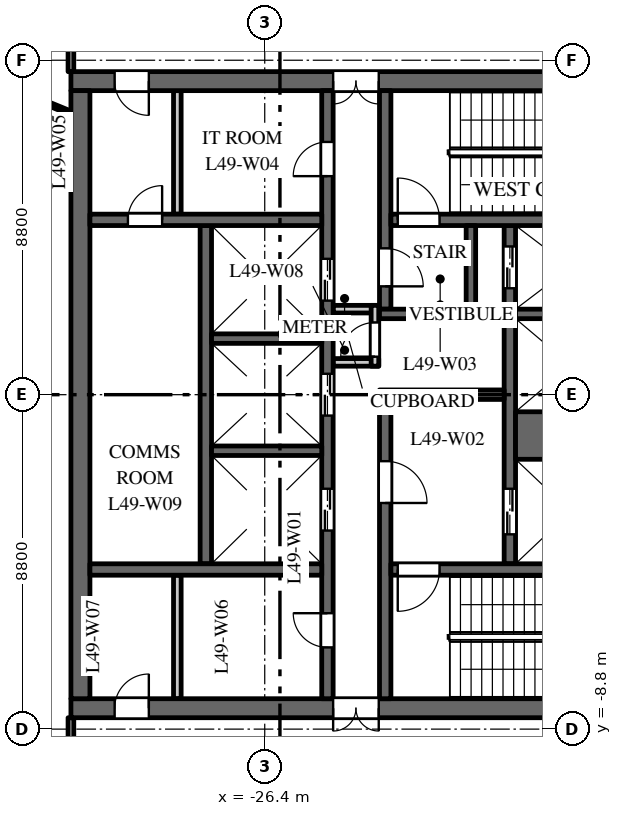
"""IFC4 building model, lengths in metres.
Left out: names, types, materials, properties, quantities, classifications, styles, units other than length and angle.
Written with IfcOpenShell. Run it as: python <this file> out.ifc"""

import sys

from ifc_helpers import new_model, si_unit, direction, frame, frame_2d, origin, place, context, subcontext, project, spatial, rectangle, extrude, element, fill, save


model = new_model("IFC4")
c1 = context("Model", 3, precision=1e-05, world=origin(), true_north=direction((0.0, 1.0)))
c2 = subcontext(c1, "Body", "Model", "MODEL_VIEW")
j1 = project(units=[si_unit("LENGTHUNIT", "METRE"), si_unit("PLANEANGLEUNIT", "RADIAN")], contexts=[c1])
p1 = place(None, origin())
s1 = spatial("IfcSite", under=j1, at=p1, CompositionType="ELEMENT")
p2 = place(p1, origin())
s2 = spatial("IfcBuilding", under=s1, at=p2, CompositionType="ELEMENT")
p3 = place(p2, frame((0.0, 0.0, 237.5)))
s3 = spatial("IfcBuildingStorey", under=s2, at=p3, CompositionType="ELEMENT", Elevation=237.5)
p4 = place(p3, frame((-16.5, 8.25, 0.0), z_axis=(0.0, 0.0, 1.0), x_axis=(-1.0, 0.0, 0.0)))
e1 = element("IfcWall", 1, at=p4, inside=s3, PredefinedType="SHEAR", context=c2, shape_type="SweptSolid", body=[
    extrude(rectangle(XDim=15.0, YDim=0.5, at=frame_2d((7.5, 0.0))), origin(), (0.0, 0.0, 1.0), 3.7),
])
p5 = place(p4, frame((6.9, 0.0, 0.0)))
e2 = element("IfcOpeningElement", 2, at=p5, cuts=e1, PredefinedType="OPENING", context=c2, shape_type="SweptSolid", body=[
    extrude(rectangle(XDim=1.2, YDim=2.1, at=frame_2d((0.6, 1.05))), frame((0.0, 0.26, 0.0), z_axis=(0.0, -1.0, 0.0), x_axis=(1.0, 0.0, 0.0)), (0.0, 0.0, 1.0), 0.52),
])
p6 = place(p4, frame((12.95, 0.0, 0.0)))
e3 = element("IfcOpeningElement", 3, at=p6, cuts=e1, PredefinedType="OPENING", context=c2, shape_type="SweptSolid", body=[
    extrude(rectangle(XDim=0.9, YDim=2.1, at=frame_2d((0.45, 1.05))), frame((0.0, 0.26, 0.0), z_axis=(0.0, -1.0, 0.0), x_axis=(1.0, 0.0, 0.0)), (0.0, 0.0, 1.0), 0.52),
])
p7 = place(p3, frame((-16.5, -8.25, 0.0), z_axis=(0.0, 0.0, 1.0), x_axis=(-1.0, 0.0, 0.0)))
e4 = element("IfcWall", 4, at=p7, inside=s3, PredefinedType="SHEAR", context=c2, shape_type="SweptSolid", body=[
    extrude(rectangle(XDim=15.0, YDim=0.5, at=frame_2d((7.5, 0.0))), origin(), (0.0, 0.0, 1.0), 3.7),
])
p8 = place(p7, frame((6.9, 0.0, 0.0)))
e5 = element("IfcOpeningElement", 5, at=p8, cuts=e4, PredefinedType="OPENING", context=c2, shape_type="SweptSolid", body=[
    extrude(rectangle(XDim=1.2, YDim=2.1, at=frame_2d((0.6, 1.05))), frame((0.0, 0.26, 0.0), z_axis=(0.0, -1.0, 0.0), x_axis=(1.0, 0.0, 0.0)), (0.0, 0.0, 1.0), 0.52),
])
p9 = place(p7, frame((12.95, 0.0, 0.0)))
e6 = element("IfcOpeningElement", 6, at=p9, cuts=e4, PredefinedType="OPENING", context=c2, shape_type="SweptSolid", body=[
    extrude(rectangle(XDim=0.9, YDim=2.1, at=frame_2d((0.45, 1.05))), frame((0.0, 0.26, 0.0), z_axis=(0.0, -1.0, 0.0), x_axis=(1.0, 0.0, 0.0)), (0.0, 0.0, 1.0), 0.52),
])
p10 = place(p3, frame((-27.95, -4.45, 0.0), z_axis=(0.0, 0.0, 1.0), x_axis=(0.0, 1.0, 0.0)))
e7 = element("IfcWall", 7, at=p10, inside=s3, PredefinedType="SHEAR", context=c2, shape_type="SweptSolid", body=[
    extrude(rectangle(XDim=8.9, YDim=0.3, at=frame_2d((4.45, 0.0))), origin(), (0.0, 0.0, 1.0), 3.7),
])
p11 = place(p3, frame((-19.95, -4.45, 0.0), z_axis=(0.0, 0.0, 1.0), x_axis=(0.0, 1.0, 0.0)))
e8 = element("IfcWall", 8, at=p11, inside=s3, PredefinedType="SHEAR", context=c2, shape_type="SweptSolid", body=[
    extrude(rectangle(XDim=8.9, YDim=0.3, at=frame_2d((4.45, 0.0))), origin(), (0.0, 0.0, 1.0), 3.7),
])
p12 = place(p11, frame((0.775, 0.0, 0.0)))
e9 = element("IfcOpeningElement", 9, at=p12, cuts=e8, PredefinedType="OPENING", context=c2, shape_type="SweptSolid", body=[
    extrude(rectangle(XDim=1.2, YDim=2.1, at=frame_2d((0.6, 1.05))), frame((0.0, 0.16, 0.0), z_axis=(0.0, -1.0, 0.0), x_axis=(1.0, 0.0, 0.0)), (0.0, 0.0, 1.0), 0.32),
])
p13 = place(p11, frame((7.25, 0.0, 0.0)))
e10 = element("IfcOpeningElement", 10, at=p13, cuts=e8, PredefinedType="OPENING", context=c2, shape_type="SweptSolid", body=[
    extrude(rectangle(XDim=1.1, YDim=2.1, at=frame_2d((0.55, 1.05))), frame((0.0, 0.16, 0.0), z_axis=(0.0, -1.0, 0.0), x_axis=(1.0, 0.0, 0.0)), (0.0, 0.0, 1.0), 0.32),
])
p14 = place(p3, frame((-24.75, -8.0, 0.0), z_axis=(0.0, 0.0, 1.0), x_axis=(0.0, 1.0, 0.0)))
e11 = element("IfcWall", 11, at=p14, inside=s3, PredefinedType="SHEAR", context=c2, shape_type="SweptSolid", body=[
    extrude(rectangle(XDim=16.0, YDim=0.3, at=frame_2d((8.0, 0.0))), origin(), (0.0, 0.0, 1.0), 3.7),
])
p15 = place(p14, frame((4.425, 0.0, 0.0)))
e12 = element("IfcOpeningElement", 12, at=p15, cuts=e11, PredefinedType="OPENING", context=c2, shape_type="SweptSolid", body=[
    extrude(rectangle(XDim=1.1, YDim=2.1, at=frame_2d((0.55, 1.05))), frame((0.0, 0.16, 0.0), z_axis=(0.0, -1.0, 0.0), x_axis=(1.0, 0.0, 0.0)), (0.0, 0.0, 1.0), 0.32),
])
p16 = place(p14, frame((7.45, 0.0, 0.0)))
e13 = element("IfcOpeningElement", 13, at=p16, cuts=e11, PredefinedType="OPENING", context=c2, shape_type="SweptSolid", body=[
    extrude(rectangle(XDim=1.1, YDim=2.1, at=frame_2d((0.55, 1.05))), frame((0.0, 0.16, 0.0), z_axis=(0.0, -1.0, 0.0), x_axis=(1.0, 0.0, 0.0)), (0.0, 0.0, 1.0), 0.32),
])
p17 = place(p14, frame((10.475, 0.0, 0.0)))
e14 = element("IfcOpeningElement", 14, at=p17, cuts=e11, PredefinedType="OPENING", context=c2, shape_type="SweptSolid", body=[
    extrude(rectangle(XDim=1.1, YDim=2.1, at=frame_2d((0.55, 1.05))), frame((0.0, 0.16, 0.0), z_axis=(0.0, -1.0, 0.0), x_axis=(1.0, 0.0, 0.0)), (0.0, 0.0, 1.0), 0.32),
])
p18 = place(p14, frame((13.75, 0.0, 0.0)))
e15 = element("IfcOpeningElement", 15, at=p18, cuts=e11, PredefinedType="OPENING", context=c2, shape_type="SweptSolid", body=[
    extrude(rectangle(XDim=0.9, YDim=2.1, at=frame_2d((0.45, 1.05))), frame((0.0, 0.16, 0.0), z_axis=(0.0, -1.0, 0.0), x_axis=(1.0, 0.0, 0.0)), (0.0, 0.0, 1.0), 0.32),
])
p19 = place(p14, frame((1.35, 0.0, 0.0)))
e16 = element("IfcOpeningElement", 16, at=p19, cuts=e11, PredefinedType="OPENING", context=c2, shape_type="SweptSolid", body=[
    extrude(rectangle(XDim=0.9, YDim=2.1, at=frame_2d((0.45, 1.05))), frame((0.0, 0.16, 0.0), z_axis=(0.0, -1.0, 0.0), x_axis=(1.0, 0.0, 0.0)), (0.0, 0.0, 1.0), 0.32),
])
p20 = place(p3, frame((-20.1, 0.0, 0.0), z_axis=(0.0, 0.0, 1.0), x_axis=(-1.0, 0.0, 0.0)))
e17 = element("IfcWall", 17, at=p20, inside=s3, PredefinedType="SHEAR", context=c2, shape_type="SweptSolid", body=[
    extrude(rectangle(XDim=3.28, YDim=0.25, at=frame_2d((1.64, 0.0))), origin(), (0.0, 0.0, 1.0), 3.7),
])
for number, where, z_axis, x_axis in (
    (18, (-23.4, 0.85, 0.0), (0.0, 0.0, 1.0), (-1.0, 0.0, 0.0)),
    (19, (-23.4, 2.25, 0.0), (0.0, 0.0, 1.0), (-1.0, 0.0, 0.0)),
):
    element("IfcWall", number, at=place(p3, frame(where, z_axis=z_axis, x_axis=x_axis)), inside=s3, PredefinedType="PARTITIONING", context=c2, shape_type="SweptSolid", body=[
        extrude(rectangle(XDim=1.2, YDim=0.2, at=frame_2d((0.6, 0.0))), origin(), (0.0, 0.0, 1.0), 3.7),
    ])
p21 = place(p3, frame((-23.5, 0.75, 0.0), z_axis=(0.0, 0.0, 1.0), x_axis=(0.0, 1.0, 0.0)))
e20 = element("IfcWall", 20, at=p21, inside=s3, PredefinedType="PARTITIONING", context=c2, shape_type="SweptSolid", body=[
    extrude(rectangle(XDim=1.6, YDim=0.2, at=frame_2d((0.8, 0.0))), origin(), (0.0, 0.0, 1.0), 3.7),
])
p22 = place(p21, frame((0.25, 0.0, 0.0)))
e21 = element("IfcOpeningElement", 21, at=p22, cuts=e20, PredefinedType="OPENING", context=c2, shape_type="SweptSolid", body=[
    extrude(rectangle(XDim=0.9, YDim=2.1, at=frame_2d((0.45, 1.05))), frame((0.0, 0.11, 0.0), z_axis=(0.0, -1.0, 0.0), x_axis=(1.0, 0.0, 0.0)), (0.0, 0.0, 1.0), 0.22),
])
p23 = place(p3, frame((-31.25, -8.0, 0.0), z_axis=(0.0, 0.0, 1.0), x_axis=(0.0, 1.0, 0.0)))
e22 = element("IfcWall", 22, at=p23, inside=s3, PredefinedType="SHEAR", context=c2, shape_type="SweptSolid", body=[
    extrude(rectangle(XDim=16.0, YDim=0.5, at=frame_2d((8.0, 0.0))), origin(), (0.0, 0.0, 1.0), 3.7),
])
p24 = place(p3, frame((-24.9, 4.6, 0.0), z_axis=(0.0, 0.0, 1.0), x_axis=(-1.0, 0.0, 0.0)))
e23 = element("IfcWall", 23, at=p24, inside=s3, PredefinedType="SHEAR", context=c2, shape_type="SweptSolid", body=[
    extrude(rectangle(XDim=6.1, YDim=0.3, at=frame_2d((3.05, 0.0))), origin(), (0.0, 0.0, 1.0), 3.7),
])
p25 = place(p24, frame((4.2, 0.0, 0.0)))
e24 = element("IfcOpeningElement", 24, at=p25, cuts=e23, PredefinedType="OPENING", context=c2, shape_type="SweptSolid", body=[
    extrude(rectangle(XDim=0.9, YDim=2.1, at=frame_2d((0.45, 1.05))), frame((0.0, 0.16, 0.0), z_axis=(0.0, -1.0, 0.0), x_axis=(1.0, 0.0, 0.0)), (0.0, 0.0, 1.0), 0.32),
])
for number, where, z_axis, x_axis in (
    (25, (-28.7, 4.75, 0.0), (0.0, 0.0, 1.0), (0.0, 1.0, 0.0)),
    (26, (-28.7, -8.0, 0.0), (0.0, 0.0, 1.0), (0.0, 1.0, 0.0)),
):
    element("IfcWall", number, at=place(p3, frame(where, z_axis=z_axis, x_axis=x_axis)), inside=s3, PredefinedType="PARTITIONING", context=c2, shape_type="SweptSolid", body=[
        extrude(rectangle(XDim=3.25, YDim=0.2, at=frame_2d((1.625, 0.0))), origin(), (0.0, 0.0, 1.0), 3.7),
    ])
p26 = place(p3, frame((-24.9, -4.6, 0.0), z_axis=(0.0, 0.0, 1.0), x_axis=(-1.0, 0.0, 0.0)))
e27 = element("IfcWall", 27, at=p26, inside=s3, PredefinedType="SHEAR", context=c2, shape_type="SweptSolid", body=[
    extrude(rectangle(XDim=6.1, YDim=0.3, at=frame_2d((3.05, 0.0))), origin(), (0.0, 0.0, 1.0), 3.7),
])
p27 = place(p3, frame((-16.9, -1.075, 0.0), z_axis=(0.0, 0.0, 1.0), x_axis=(-1.0, 0.0, 0.0)))
e28 = element("IfcWall", 28, at=p27, inside=s3, PredefinedType="SHEAR", context=c2, shape_type="SweptSolid", body=[
    extrude(rectangle(XDim=2.9, YDim=1.25, at=frame_2d((1.45, 0.0))), origin(), (0.0, 0.0, 1.0), 3.7),
])
for number, where, z_axis, x_axis in (
    (29, (-16.9, 2.125, 0.0), (0.0, 0.0, 1.0), (-1.0, 0.0, 0.0)),
    (30, (-24.9, -1.475, 0.0), (0.0, 0.0, 1.0), (-1.0, 0.0, 0.0)),
    (31, (-24.9, 1.475, 0.0), (0.0, 0.0, 1.0), (-1.0, 0.0, 0.0)),
):
    element("IfcWall", number, at=place(p3, frame(where, z_axis=z_axis, x_axis=x_axis)), inside=s3, PredefinedType="SHEAR", context=c2, shape_type="SweptSolid", body=[
        extrude(rectangle(XDim=2.9, YDim=0.25, at=frame_2d((1.45, 0.0))), origin(), (0.0, 0.0, 1.0), 3.7),
    ])
p28 = place(p3, frame((-23.23, 2.25, 0.0), z_axis=(0.0, 0.0, 1.0), x_axis=(0.0, 1.0, 0.0)))
e32 = element("IfcWall", 32, at=p28, inside=s3, PredefinedType="SHEAR", context=c2, shape_type="SweptSolid", body=[
    extrude(rectangle(XDim=5.75, YDim=0.3, at=frame_2d((2.875, 0.0))), origin(), (0.0, 0.0, 1.0), 3.7),
])
p29 = place(p28, frame((0.6, 0.0, 0.0)))
e33 = element("IfcOpeningElement", 33, at=p29, cuts=e32, PredefinedType="OPENING", context=c2, shape_type="SweptSolid", body=[
    extrude(rectangle(XDim=1.0, YDim=2.1, at=frame_2d((0.5, 1.05))), frame((0.0, 0.16, 0.0), z_axis=(0.0, -1.0, 0.0), x_axis=(1.0, 0.0, 0.0)), (0.0, 0.0, 1.0), 0.32),
])
p30 = place(p3, frame((-23.23, -8.0, 0.0), z_axis=(0.0, 0.0, 1.0), x_axis=(0.0, 1.0, 0.0)))
e34 = element("IfcWall", 34, at=p30, inside=s3, PredefinedType="SHEAR", context=c2, shape_type="SweptSolid", body=[
    extrude(rectangle(XDim=7.875, YDim=0.3, at=frame_2d((3.938, 0.0))), origin(), (0.0, 0.0, 1.0), 3.7),
])
p31 = place(p30, frame((5.15, 0.0, 0.0)))
e35 = element("IfcOpeningElement", 35, at=p31, cuts=e34, PredefinedType="OPENING", context=c2, shape_type="SweptSolid", body=[
    extrude(rectangle(XDim=1.1, YDim=2.1, at=frame_2d((0.55, 1.05))), frame((0.0, 0.16, 0.0), z_axis=(0.0, -1.0, 0.0), x_axis=(1.0, 0.0, 0.0)), (0.0, 0.0, 1.0), 0.32),
])
p32 = place(p3, frame((-16.9, 4.6, 0.0), z_axis=(0.0, 0.0, 1.0), x_axis=(-1.0, 0.0, 0.0)))
e36 = element("IfcWall", 36, at=p32, inside=s3, PredefinedType="SHEAR", context=c2, shape_type="SweptSolid", body=[
    extrude(rectangle(XDim=6.18, YDim=0.3, at=frame_2d((3.09, 0.0))), origin(), (0.0, 0.0, 1.0), 3.7),
])
p33 = place(p32, frame((4.9, 0.0, 0.0)))
e37 = element("IfcOpeningElement", 37, at=p33, cuts=e36, PredefinedType="OPENING", context=c2, shape_type="SweptSolid", body=[
    extrude(rectangle(XDim=1.1, YDim=2.1, at=frame_2d((0.55, 1.05))), frame((0.0, 0.16, 0.0), z_axis=(0.0, -1.0, 0.0), x_axis=(1.0, 0.0, 0.0)), (0.0, 0.0, 1.0), 0.32),
])
p34 = place(p3, frame((-16.9, -4.6, 0.0), z_axis=(0.0, 0.0, 1.0), x_axis=(-1.0, 0.0, 0.0)))
e38 = element("IfcWall", 38, at=p34, inside=s3, PredefinedType="SHEAR", context=c2, shape_type="SweptSolid", body=[
    extrude(rectangle(XDim=6.18, YDim=0.3, at=frame_2d((3.09, 0.0))), origin(), (0.0, 0.0, 1.0), 3.7),
])
p35 = place(p34, frame((4.9, 0.0, 0.0)))
e39 = element("IfcOpeningElement", 39, at=p35, cuts=e38, PredefinedType="OPENING", context=c2, shape_type="SweptSolid", body=[
    extrude(rectangle(XDim=1.1, YDim=2.1, at=frame_2d((0.55, 1.05))), frame((0.0, 0.16, 0.0), z_axis=(0.0, -1.0, 0.0), x_axis=(1.0, 0.0, 0.0)), (0.0, 0.0, 1.0), 0.32),
])
p36 = place(p3, frame((-20.85, 2.125, 0.0), z_axis=(0.0, 0.0, 1.0), x_axis=(-1.0, 0.0, 0.0)))
e40 = element("IfcWall", 40, at=p36, inside=s3, PredefinedType="SHEAR", context=c2, shape_type="SweptSolid", body=[
    extrude(rectangle(XDim=2.53, YDim=0.25, at=frame_2d((1.265, 0.0))), origin(), (0.0, 0.0, 1.0), 3.7),
])
p37 = place(p3, frame((-20.975, 2.25, 0.0), z_axis=(0.0, 0.0, 1.0), x_axis=(0.0, 1.0, 0.0)))
e41 = element("IfcWall", 41, at=p37, inside=s3, PredefinedType="SHEAR", context=c2, shape_type="SweptSolid", body=[
    extrude(rectangle(XDim=2.2, YDim=0.25, at=frame_2d((1.1, 0.0))), origin(), (0.0, 0.0, 1.0), 3.7),
])
p38 = place(p3, frame((-34.234, 8.53, 0.0), z_axis=(0.0, 0.0, 1.0), x_axis=(0.925344112436, -0.379128307542, 0.0)))
e42 = element("IfcWall", 42, at=p38, inside=s3, PredefinedType="PARTITIONING", context=c2, shape_type="SweptSolid", body=[
    extrude(rectangle(XDim=2.954, YDim=0.1, at=frame_2d((1.477, 0.0))), origin(), (0.0, 0.0, 1.0), 3.0),
])
for number, where, z_axis, x_axis in (
    (43, (-31.5, -10.7, 0.0), (0.0, 0.0, 1.0), (0.0, 1.0, 0.0)),
    (44, (-31.5, 8.5, 0.0), (0.0, 0.0, 1.0), (0.0, 1.0, 0.0)),
):
    element("IfcWall", number, at=place(p3, frame(where, z_axis=z_axis, x_axis=x_axis)), inside=s3, PredefinedType="PARTITIONING", context=c2, shape_type="SweptSolid", body=[
        extrude(rectangle(XDim=2.2, YDim=0.15, at=frame_2d((1.1, 0.0))), origin(), (0.0, 0.0, 1.0), 3.7),
    ])
p39 = place(p12, origin())
e45 = element("IfcDoor", 45, at=p39, inside=s3, OperationType="DOUBLE_DOOR_SLIDING", PredefinedType="DOOR", context=c2, shape_type="SweptSolid", body=[
    extrude(rectangle(XDim=1.2, YDim=2.1, at=frame_2d((0.6, 1.05))), frame((0.0, 0.025, 0.0), z_axis=(0.0, -1.0, 0.0), x_axis=(1.0, 0.0, 0.0)), (0.0, 0.0, 1.0), 0.05),
])
fill(e9, e45)
p40 = place(p13, origin())
e46 = element("IfcDoor", 46, at=p40, inside=s3, OperationType="DOUBLE_DOOR_SLIDING", PredefinedType="DOOR", context=c2, shape_type="SweptSolid", body=[
    extrude(rectangle(XDim=1.1, YDim=2.1, at=frame_2d((0.55, 1.05))), frame((0.0, 0.025, 0.0), z_axis=(0.0, -1.0, 0.0), x_axis=(1.0, 0.0, 0.0)), (0.0, 0.0, 1.0), 0.05),
])
fill(e10, e46)
p41 = place(p15, origin())
e47 = element("IfcDoor", 47, at=p41, inside=s3, OperationType="DOUBLE_DOOR_SLIDING", PredefinedType="DOOR", context=c2, shape_type="SweptSolid", body=[
    extrude(rectangle(XDim=1.1, YDim=2.1, at=frame_2d((0.55, 1.05))), frame((0.0, 0.025, 0.0), z_axis=(0.0, -1.0, 0.0), x_axis=(1.0, 0.0, 0.0)), (0.0, 0.0, 1.0), 0.05),
])
fill(e12, e47)
p42 = place(p16, origin())
e48 = element("IfcDoor", 48, at=p42, inside=s3, OperationType="DOUBLE_DOOR_SLIDING", PredefinedType="DOOR", context=c2, shape_type="SweptSolid", body=[
    extrude(rectangle(XDim=1.1, YDim=2.1, at=frame_2d((0.55, 1.05))), frame((0.0, 0.025, 0.0), z_axis=(0.0, -1.0, 0.0), x_axis=(1.0, 0.0, 0.0)), (0.0, 0.0, 1.0), 0.05),
])
fill(e13, e48)
p43 = place(p17, origin())
e49 = element("IfcDoor", 49, at=p43, inside=s3, OperationType="DOUBLE_DOOR_SLIDING", PredefinedType="DOOR", context=c2, shape_type="SweptSolid", body=[
    extrude(rectangle(XDim=1.1, YDim=2.1, at=frame_2d((0.55, 1.05))), frame((0.0, 0.025, 0.0), z_axis=(0.0, -1.0, 0.0), x_axis=(1.0, 0.0, 0.0)), (0.0, 0.0, 1.0), 0.05),
])
fill(e14, e49)
p44 = place(p33, origin())
e50 = element("IfcDoor", 50, at=p44, inside=s3, OperationType="SINGLE_SWING_RIGHT", PredefinedType="DOOR", context=c2, shape_type="SweptSolid", body=[
    extrude(rectangle(XDim=1.1, YDim=2.1, at=frame_2d((0.55, 1.05))), frame((0.0, 0.025, 0.0), z_axis=(0.0, -1.0, 0.0), x_axis=(1.0, 0.0, 0.0)), (0.0, 0.0, 1.0), 0.05),
])
fill(e37, e50)
p45 = place(p35, origin())
e51 = element("IfcDoor", 51, at=p45, inside=s3, OperationType="SINGLE_SWING_LEFT", PredefinedType="DOOR", context=c2, shape_type="SweptSolid", body=[
    extrude(rectangle(XDim=1.1, YDim=2.1, at=frame_2d((0.55, 1.05))), frame((0.0, 0.025, 0.0), z_axis=(0.0, -1.0, 0.0), x_axis=(1.0, 0.0, 0.0)), (0.0, 0.0, 1.0), 0.05),
])
fill(e39, e51)
p46 = place(p31, origin())
e52 = element("IfcDoor", 52, at=p46, inside=s3, OperationType="SINGLE_SWING_LEFT", PredefinedType="DOOR", context=c2, shape_type="SweptSolid", body=[
    extrude(rectangle(XDim=1.1, YDim=2.1, at=frame_2d((0.55, 1.05))), frame((0.0, 0.025, 0.0), z_axis=(0.0, -1.0, 0.0), x_axis=(1.0, 0.0, 0.0)), (0.0, 0.0, 1.0), 0.05),
])
fill(e35, e52)
p47 = place(p29, origin())
e53 = element("IfcDoor", 53, at=p47, inside=s3, OperationType="SINGLE_SWING_LEFT", PredefinedType="DOOR", context=c2, shape_type="SweptSolid", body=[
    extrude(rectangle(XDim=1.0, YDim=2.1, at=frame_2d((0.5, 1.05))), frame((0.0, 0.025, 0.0), z_axis=(0.0, -1.0, 0.0), x_axis=(1.0, 0.0, 0.0)), (0.0, 0.0, 1.0), 0.05),
])
fill(e33, e53)
p48 = place(p5, origin())
e54 = element("IfcDoor", 54, at=p48, inside=s3, OperationType="DOUBLE_DOOR_DOUBLE_SWING", PredefinedType="DOOR", context=c2, shape_type="SweptSolid", body=[
    extrude(rectangle(XDim=1.2, YDim=2.1, at=frame_2d((0.6, 1.05))), frame((0.0, 0.025, 0.0), z_axis=(0.0, -1.0, 0.0), x_axis=(1.0, 0.0, 0.0)), (0.0, 0.0, 1.0), 0.05),
])
fill(e2, e54)
p49 = place(p8, origin())
e55 = element("IfcDoor", 55, at=p49, inside=s3, OperationType="DOUBLE_DOOR_DOUBLE_SWING", PredefinedType="DOOR", context=c2, shape_type="SweptSolid", body=[
    extrude(rectangle(XDim=1.2, YDim=2.1, at=frame_2d((0.6, 1.05))), frame((0.0, 0.025, 0.0), z_axis=(0.0, -1.0, 0.0), x_axis=(1.0, 0.0, 0.0)), (0.0, 0.0, 1.0), 0.05),
])
fill(e5, e55)
p50 = place(p18, origin())
e56 = element("IfcDoor", 56, at=p50, inside=s3, OperationType="SINGLE_SWING_RIGHT", PredefinedType="DOOR", context=c2, shape_type="SweptSolid", body=[
    extrude(rectangle(XDim=0.9, YDim=2.1, at=frame_2d((0.45, 1.05))), frame((0.0, 0.025, 0.0), z_axis=(0.0, -1.0, 0.0), x_axis=(1.0, 0.0, 0.0)), (0.0, 0.0, 1.0), 0.05),
])
fill(e15, e56)
p51 = place(p6, origin())
e57 = element("IfcDoor", 57, at=p51, inside=s3, OperationType="SINGLE_SWING_RIGHT", PredefinedType="DOOR", context=c2, shape_type="SweptSolid", body=[
    extrude(rectangle(XDim=0.9, YDim=2.1, at=frame_2d((0.45, 1.05))), frame((0.0, 0.025, 0.0), z_axis=(0.0, -1.0, 0.0), x_axis=(1.0, 0.0, 0.0)), (0.0, 0.0, 1.0), 0.05),
])
fill(e3, e57)
p52 = place(p19, origin())
e58 = element("IfcDoor", 58, at=p52, inside=s3, OperationType="SINGLE_SWING_LEFT", PredefinedType="DOOR", context=c2, shape_type="SweptSolid", body=[
    extrude(rectangle(XDim=0.9, YDim=2.1, at=frame_2d((0.45, 1.05))), frame((0.0, 0.025, 0.0), z_axis=(0.0, -1.0, 0.0), x_axis=(1.0, 0.0, 0.0)), (0.0, 0.0, 1.0), 0.05),
])
fill(e16, e58)
p53 = place(p9, origin())
e59 = element("IfcDoor", 59, at=p53, inside=s3, OperationType="SINGLE_SWING_LEFT", PredefinedType="DOOR", context=c2, shape_type="SweptSolid", body=[
    extrude(rectangle(XDim=0.9, YDim=2.1, at=frame_2d((0.45, 1.05))), frame((0.0, 0.025, 0.0), z_axis=(0.0, -1.0, 0.0), x_axis=(1.0, 0.0, 0.0)), (0.0, 0.0, 1.0), 0.05),
])
fill(e6, e59)
p54 = place(p22, origin())
e60 = element("IfcDoor", 60, at=p54, inside=s3, OperationType="SINGLE_SWING_RIGHT", PredefinedType="DOOR", context=c2, shape_type="SweptSolid", body=[
    extrude(rectangle(XDim=0.9, YDim=2.1, at=frame_2d((0.45, 1.05))), frame((0.0, 0.025, 0.0), z_axis=(0.0, -1.0, 0.0), x_axis=(1.0, 0.0, 0.0)), (0.0, 0.0, 1.0), 0.05),
])
fill(e21, e60)
p55 = place(p25, origin())
e61 = element("IfcDoor", 61, at=p55, inside=s3, OperationType="SINGLE_SWING_LEFT", PredefinedType="DOOR", context=c2, shape_type="SweptSolid", body=[
    extrude(rectangle(XDim=0.9, YDim=2.1, at=frame_2d((0.45, 1.05))), frame((0.0, 0.025, 0.0), z_axis=(0.0, -1.0, 0.0), x_axis=(1.0, 0.0, 0.0)), (0.0, 0.0, 1.0), 0.05),
])
fill(e24, e61)
save(model, sys.argv[1])
